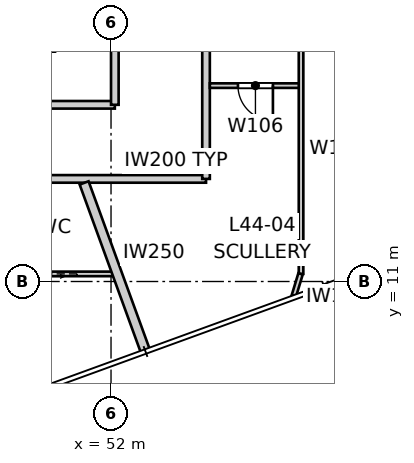
"""IFC4 building model, lengths in metres.
Left out: names, types, materials, properties, quantities, classifications, styles, units other than length and angle.
Written with IfcOpenShell. Run it as: python <this file> out.ifc"""

import sys

from ifc_helpers import new_model, si_unit, direction, frame, frame_2d, origin, place, context, subcontext, project, spatial, rectangle, extrude, element, fill, save


model = new_model("IFC4")
c1 = context("Model", 3, precision=1e-05, world=origin(), true_north=direction((0.0, 1.0)))
c2 = subcontext(c1, "Body", "Model", "MODEL_VIEW")
j1 = project(units=[si_unit("LENGTHUNIT", "METRE"), si_unit("PLANEANGLEUNIT", "RADIAN")], contexts=[c1])
p1 = place(None, origin())
s1 = spatial("IfcSite", under=j1, at=p1, CompositionType="ELEMENT")
p2 = place(p1, origin())
s2 = spatial("IfcBuilding", under=s1, at=p2, CompositionType="ELEMENT")
p3 = place(p2, frame((0.0, 0.0, 160.8)))
s3 = spatial("IfcBuildingStorey", under=s2, at=p3, CompositionType="ELEMENT", Elevation=160.8)
p4 = place(p3, frame((49.242, 13.7, 0.0), z_axis=(0.0, 0.0, 1.0), x_axis=(1.0, 0.0, 0.0)))
e1 = element("IfcWall", 1, at=p4, inside=s3, PredefinedType="PARTITIONING", context=c2, shape_type="SweptSolid", body=[
    extrude(rectangle(XDim=5.258, YDim=0.2, at=frame_2d((2.629, 0.0))), origin(), (0.0, 0.0, 1.0), 3.25),
])
p5 = place(p3, frame((54.5, 13.7, 0.0), z_axis=(0.0, 0.0, 1.0), x_axis=(0.0, 1.0, 0.0)))
e2 = element("IfcWall", 2, at=p5, inside=s3, PredefinedType="PARTITIONING", context=c2, shape_type="SweptSolid", body=[
    extrude(rectangle(XDim=33.4, YDim=0.2, at=frame_2d((16.7, 0.0))), origin(), (0.0, 0.0, 1.0), 3.25),
])
p6 = place(p5, frame((5.028, 0.0, 0.0)))
e3 = element("IfcOpeningElement", 3, at=p6, cuts=e2, PredefinedType="OPENING", context=c2, shape_type="SweptSolid", body=[
    extrude(rectangle(XDim=1.02, YDim=2.1, at=frame_2d((0.51, 1.05))), frame((0.0, 0.11, 0.0), z_axis=(0.0, -1.0, 0.0), x_axis=(1.0, 0.0, 0.0)), (0.0, 0.0, 1.0), 0.22),
])
p7 = place(p5, frame((13.587, 0.0, 0.0)))
e4 = element("IfcOpeningElement", 4, at=p7, cuts=e2, PredefinedType="OPENING", context=c2, shape_type="SweptSolid", body=[
    extrude(rectangle(XDim=1.02, YDim=2.34, at=frame_2d((0.51, 1.17))), frame((0.0, 0.11, 0.0), z_axis=(0.0, -1.0, 0.0), x_axis=(1.0, 0.0, 0.0)), (0.0, 0.0, 1.0), 0.22),
])
p8 = place(p3, frame((52.907, 9.157, 0.0), z_axis=(0.0, 0.0, 1.0), x_axis=(-0.342012883883, 0.939695262975, 0.0)))
e5 = element("IfcWall", 5, at=p8, inside=s3, PredefinedType="PARTITIONING", context=c2, shape_type="SweptSolid", body=[
    extrude(rectangle(XDim=4.722, YDim=0.25, at=frame_2d((2.361, 0.0))), origin(), (0.0, 0.0, 1.0), 3.25),
])
p9 = place(p3, frame((27.9, 15.65, 0.0), z_axis=(0.0, 0.0, 1.0), x_axis=(1.0, 0.0, 0.0)))
e6 = element("IfcWall", 6, at=p9, inside=s3, PredefinedType="PARTITIONING", context=c2, shape_type="SweptSolid", body=[
    extrude(rectangle(XDim=24.2, YDim=0.2, at=frame_2d((12.1, 0.0))), origin(), (0.0, 0.0, 1.0), 3.25),
])
p10 = place(p9, frame((4.391, 0.0, 0.0)))
e7 = element("IfcOpeningElement", 7, at=p10, cuts=e6, PredefinedType="OPENING", context=c2, shape_type="SweptSolid", body=[
    extrude(rectangle(XDim=1.02, YDim=2.1, at=frame_2d((0.51, 1.05))), frame((0.0, 0.11, 0.0), z_axis=(0.0, -1.0, 0.0), x_axis=(1.0, 0.0, 0.0)), (0.0, 0.0, 1.0), 0.22),
])
p11 = place(p9, frame((18.789, 0.0, 0.0)))
e8 = element("IfcOpeningElement", 8, at=p11, cuts=e6, PredefinedType="OPENING", context=c2, shape_type="SweptSolid", body=[
    extrude(rectangle(XDim=1.02, YDim=2.1, at=frame_2d((0.51, 1.05))), frame((0.0, 0.11, 0.0), z_axis=(0.0, -1.0, 0.0), x_axis=(1.0, 0.0, 0.0)), (0.0, 0.0, 1.0), 0.22),
])
p12 = place(p9, frame((11.59, 0.0, 0.0)))
e9 = element("IfcOpeningElement", 9, at=p12, cuts=e6, PredefinedType="OPENING", context=c2, shape_type="SweptSolid", body=[
    extrude(rectangle(XDim=1.02, YDim=2.1, at=frame_2d((0.51, 1.05))), frame((0.0, 0.11, 0.0), z_axis=(0.0, -1.0, 0.0), x_axis=(1.0, 0.0, 0.0)), (0.0, 0.0, 1.0), 0.22),
])
p13 = place(p3, frame((52.1, 15.65, 0.0), z_axis=(0.0, 0.0, 1.0), x_axis=(0.0, 1.0, 0.0)))
e10 = element("IfcWall", 10, at=p13, inside=s3, PredefinedType="PARTITIONING", context=c2, shape_type="SweptSolid", body=[
    extrude(rectangle(XDim=3.17, YDim=0.2, at=frame_2d((1.585, 0.0))), origin(), (0.0, 0.0, 1.0), 3.25),
])
p14 = place(p3, frame((52.164, 11.2, 0.0), z_axis=(0.0, 0.0, 1.0), x_axis=(-1.0, 0.0, 0.0)))
e11 = element("IfcWall", 11, at=p14, inside=s3, PredefinedType="PARTITIONING", context=c2, shape_type="SweptSolid", body=[
    extrude(rectangle(XDim=6.964, YDim=0.12, at=frame_2d((3.482, 0.0))), origin(), (0.0, 0.0, 1.0), 3.25),
])
p15 = place(p14, frame((5.656, 0.0, 0.0)))
e12 = element("IfcOpeningElement", 12, at=p15, cuts=e11, PredefinedType="OPENING", context=c2, shape_type="SweptSolid", body=[
    extrude(rectangle(XDim=0.92, YDim=2.34, at=frame_2d((0.46, 1.17))), frame((0.0, 0.07, 0.0), z_axis=(0.0, -1.0, 0.0), x_axis=(1.0, 0.0, 0.0)), (0.0, 0.0, 1.0), 0.14),
])
p16 = place(p14, frame((1.919, 0.0, 0.0)))
e13 = element("IfcOpeningElement", 13, at=p16, cuts=e11, PredefinedType="OPENING", context=c2, shape_type="SweptSolid", body=[
    extrude(rectangle(XDim=0.96, YDim=2.1, at=frame_2d((0.48, 1.05))), frame((0.0, 0.07, 0.0), z_axis=(0.0, -1.0, 0.0), x_axis=(1.0, 0.0, 0.0)), (0.0, 0.0, 1.0), 0.14),
])
p17 = place(p3, frame((57.0, 16.155, 0.0), z_axis=(0.0, 0.0, 1.0), x_axis=(-1.0, 0.0, 0.0)))
e14 = element("IfcWall", 14, at=p17, inside=s3, PredefinedType="PARTITIONING", context=c2, shape_type="SweptSolid", body=[
    extrude(rectangle(XDim=2.4, YDim=0.12, at=frame_2d((1.2, 0.0))), origin(), (0.0, 0.0, 1.0), 3.25),
])
p18 = place(p17, frame((0.74, 0.0, 0.0)))
e15 = element("IfcOpeningElement", 15, at=p18, cuts=e14, PredefinedType="OPENING", context=c2, shape_type="SweptSolid", body=[
    extrude(rectangle(XDim=0.92, YDim=2.34, at=frame_2d((0.46, 1.17))), frame((0.0, 0.07, 0.0), z_axis=(0.0, -1.0, 0.0), x_axis=(1.0, 0.0, 0.0)), (0.0, 0.0, 1.0), 0.14),
])
p19 = place(p3, frame((57.0, 30.92, 0.0), z_axis=(0.0, 0.0, 1.0), x_axis=(0.0, -1.0, 0.0)))
e16 = element("IfcWall", 16, at=p19, inside=s3, PredefinedType="PARTITIONING", context=c2, shape_type="SweptSolid", body=[
    extrude(rectangle(XDim=19.72, YDim=0.12, at=frame_2d((9.86, 0.0))), origin(), (0.0, 0.0, 1.0), 2.55),
])
p20 = place(p19, frame((12.243, 0.0, 0.0)))
e17 = element("IfcOpeningElement", 17, at=p20, cuts=e16, PredefinedType="OPENING", context=c2, shape_type="SweptSolid", body=[
    extrude(rectangle(XDim=0.92, YDim=2.34, at=frame_2d((0.46, 1.17))), frame((0.0, 0.07, 0.0), z_axis=(0.0, -1.0, 0.0), x_axis=(1.0, 0.0, 0.0)), (0.0, 0.0, 1.0), 0.14),
])
p21 = place(p19, frame((8.764, 0.0, 0.0)))
e18 = element("IfcOpeningElement", 18, at=p21, cuts=e16, PredefinedType="OPENING", context=c2, shape_type="SweptSolid", body=[
    extrude(rectangle(XDim=0.92, YDim=2.34, at=frame_2d((0.46, 1.17))), frame((0.0, 0.07, 0.0), z_axis=(0.0, -1.0, 0.0), x_axis=(1.0, 0.0, 0.0)), (0.0, 0.0, 1.0), 0.14),
])
p22 = place(p19, frame((2.227, 0.0, 0.0)))
e19 = element("IfcOpeningElement", 19, at=p22, cuts=e16, PredefinedType="OPENING", context=c2, shape_type="SweptSolid", body=[
    extrude(rectangle(XDim=0.92, YDim=2.34, at=frame_2d((0.46, 1.17))), frame((0.0, 0.07, 0.0), z_axis=(0.0, -1.0, 0.0), x_axis=(1.0, 0.0, 0.0)), (0.0, 0.0, 1.0), 0.14),
])
p23 = place(p3, frame((56.987, 11.2, 0.0), z_axis=(0.0, 0.0, 1.0), x_axis=(-0.290455219909, -0.956888585588, 0.0)))
e20 = element("IfcWall", 20, at=p23, inside=s3, PredefinedType="PARTITIONING", context=c2, shape_type="SweptSolid", body=[
    extrude(rectangle(XDim=0.605, YDim=0.12, at=frame_2d((0.303, 0.0))), origin(), (0.0, 0.0, 1.0), 3.25),
])
p24 = place(p18, origin())
e21 = element("IfcDoor", 21, at=p24, inside=s3, OperationType="SINGLE_SWING_LEFT", PredefinedType="DOOR", context=c2, shape_type="SweptSolid", body=[
    extrude(rectangle(XDim=0.92, YDim=2.34, at=frame_2d((0.46, 1.17))), frame((0.0, 0.025, 0.0), z_axis=(0.0, -1.0, 0.0), x_axis=(1.0, 0.0, 0.0)), (0.0, 0.0, 1.0), 0.05),
])
fill(e15, e21)
save(model, sys.argv[1])
